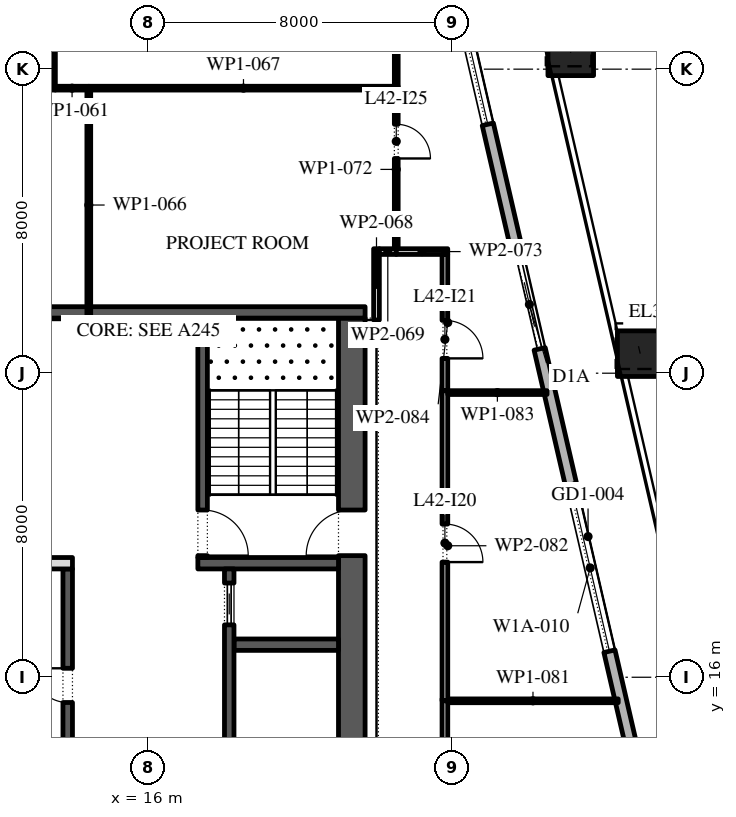
"""IFC4 building model, lengths in metres.
Left out: names, types, materials, properties, quantities, classifications, styles, units other than length and angle.
Written with IfcOpenShell. Run it as: python <this file> out.ifc"""

import sys

from ifc_helpers import new_model, si_unit, direction, frame, frame_2d, origin, origin_2d, place, context, subcontext, project, spatial, rectangle, extrude, element, fill, save


model = new_model("IFC4")
c1 = context("Model", 3, precision=1e-05, world=origin(), true_north=direction((0.0, 1.0)))
c2 = subcontext(c1, "Body", "Model", "MODEL_VIEW")
j1 = project(units=[si_unit("LENGTHUNIT", "METRE"), si_unit("PLANEANGLEUNIT", "RADIAN")], contexts=[c1])
p1 = place(None, origin())
s1 = spatial("IfcSite", under=j1, at=p1, CompositionType="ELEMENT")
p2 = place(p1, origin())
s2 = spatial("IfcBuilding", under=s1, at=p2, CompositionType="ELEMENT")
p3 = place(p2, frame((0.0, 0.0, 192.6)))
s3 = spatial("IfcBuildingStorey", under=s2, at=p3, CompositionType="ELEMENT", Elevation=192.6)
p4 = place(p3, frame((28.939, 24.514, 0.0), z_axis=(-0.010799648955, 0.046682353548, 0.998851403087), x_axis=(-0.974268511785, -0.225390476607, 0.0)))
e1 = element("IfcColumn", 1, at=p4, inside=s3, PredefinedType="COLUMN", context=c2, shape_type="SweptSolid", body=[
    extrude(rectangle(XDim=1.2, YDim=1.2, at=origin_2d()), origin(), (0.0, 0.0, 1.0), 4.205),
])
p5 = place(p3, frame((27.112, 32.43, 0.0), z_axis=(-0.013519814281, 0.05837310372, 0.998203283597), x_axis=(-0.974211350104, -0.225637420054, 0.0)))
e2 = element("IfcColumn", 2, at=p5, inside=s3, PredefinedType="COLUMN", context=c2, shape_type="SweptSolid", body=[
    extrude(rectangle(XDim=1.2, YDim=1.2, at=origin_2d()), origin(), (0.0, 0.0, 1.0), 4.208),
])
p6 = place(p3, frame((33.157, -5.092, 0.0), z_axis=(0.0, 0.0, 1.0), x_axis=(-0.224950279389, 0.974370243697, 0.0)))
e3 = element("IfcWall", 3, at=p6, inside=s3, PredefinedType="STANDARD", context=c2, shape_type="SweptSolid", body=[
    extrude(rectangle(XDim=49.5, YDim=0.3, at=frame_2d((24.75, 0.0))), origin(), (0.0, 0.0, 1.0), 4.0),
])
p7 = place(p6, frame((2.207, 0.0, 0.0)))
e4 = element("IfcOpeningElement", 4, at=p7, cuts=e3, PredefinedType="OPENING", context=c2, shape_type="SweptSolid", body=[
    extrude(rectangle(XDim=2.4, YDim=3.125, at=frame_2d((1.2, 1.562))), frame((0.0, 0.16, 0.0), z_axis=(0.0, -1.0, 0.0), x_axis=(1.0, 0.0, 0.0)), (0.0, 0.0, 1.0), 0.32),
])
p8 = place(p6, frame((8.121, 0.0, 0.45)))
e5 = element("IfcOpeningElement", 5, at=p8, cuts=e3, PredefinedType="OPENING", context=c2, shape_type="SweptSolid", body=[
    extrude(rectangle(XDim=4.5, YDim=2.875, at=frame_2d((2.25, 1.438))), frame((0.0, 0.16, 0.0), z_axis=(0.0, -1.0, 0.0), x_axis=(1.0, 0.0, 0.0)), (0.0, 0.0, 1.0), 0.32),
])
p9 = place(p6, frame((15.236, 0.0, 0.45)))
e6 = element("IfcOpeningElement", 6, at=p9, cuts=e3, PredefinedType="OPENING", context=c2, shape_type="SweptSolid", body=[
    extrude(rectangle(XDim=4.5, YDim=2.875, at=frame_2d((2.25, 1.438))), frame((0.0, 0.16, 0.0), z_axis=(0.0, -1.0, 0.0), x_axis=(1.0, 0.0, 0.0)), (0.0, 0.0, 1.0), 0.32),
])
p10 = place(p6, frame((22.35, 0.0, 0.45)))
e7 = element("IfcOpeningElement", 7, at=p10, cuts=e3, PredefinedType="OPENING", context=c2, shape_type="SweptSolid", body=[
    extrude(rectangle(XDim=4.5, YDim=3.0, at=frame_2d((2.25, 1.5))), frame((0.0, 0.16, 0.0), z_axis=(0.0, -1.0, 0.0), x_axis=(1.0, 0.0, 0.0)), (0.0, 0.0, 1.0), 0.32),
])
p11 = place(p6, frame((30.514, 0.0, 0.0)))
e8 = element("IfcOpeningElement", 8, at=p11, cuts=e3, PredefinedType="OPENING", context=c2, shape_type="SweptSolid", body=[
    extrude(rectangle(XDim=2.4, YDim=3.45, at=frame_2d((1.2, 1.725))), frame((0.0, 0.16, 0.0), z_axis=(0.0, -1.0, 0.0), x_axis=(1.0, 0.0, 0.0)), (0.0, 0.0, 1.0), 0.32),
])
p12 = place(p6, frame((36.579, 0.0, 0.45)))
e9 = element("IfcOpeningElement", 9, at=p12, cuts=e3, PredefinedType="OPENING", context=c2, shape_type="SweptSolid", body=[
    extrude(rectangle(XDim=4.5, YDim=3.05, at=frame_2d((2.25, 1.525))), frame((0.0, 0.16, 0.0), z_axis=(0.0, -1.0, 0.0), x_axis=(1.0, 0.0, 0.0)), (0.0, 0.0, 1.0), 0.32),
])
p13 = place(p6, frame((43.693, 0.0, 0.45)))
e10 = element("IfcOpeningElement", 10, at=p13, cuts=e3, PredefinedType="OPENING", context=c2, shape_type="SweptSolid", body=[
    extrude(rectangle(XDim=4.5, YDim=3.05, at=frame_2d((2.25, 1.525))), frame((0.0, 0.16, 0.0), z_axis=(0.0, -1.0, 0.0), x_axis=(1.0, 0.0, 0.0)), (0.0, 0.0, 1.0), 0.32),
])
p14 = place(p3, frame((21.35, -2.45, 0.0), z_axis=(0.0, 0.0, 1.0), x_axis=(0.0, 1.0, 0.0)))
e11 = element("IfcWall", 11, at=p14, inside=s3, PredefinedType="SHEAR", context=c2, shape_type="SweptSolid", body=[
    extrude(rectangle(XDim=27.9, YDim=0.7, at=frame_2d((13.95, 0.0))), origin(), (0.0, 0.0, 1.0), 4.0),
])
p15 = place(p14, frame((5.05, 0.0, 0.0)))
e12 = element("IfcOpeningElement", 12, at=p15, cuts=e11, PredefinedType="OPENING", context=c2, shape_type="SweptSolid", body=[
    extrude(rectangle(XDim=1.2, YDim=2.1, at=frame_2d((0.6, 1.05))), frame((0.0, 0.36, 0.0), z_axis=(0.0, -1.0, 0.0), x_axis=(1.0, 0.0, 0.0)), (0.0, 0.0, 1.0), 0.72),
])
p16 = place(p14, frame((21.65, 0.0, 0.0)))
e13 = element("IfcOpeningElement", 13, at=p16, cuts=e11, PredefinedType="OPENING", context=c2, shape_type="SweptSolid", body=[
    extrude(rectangle(XDim=1.2, YDim=2.1, at=frame_2d((0.6, 1.05))), frame((0.0, 0.36, 0.0), z_axis=(0.0, -1.0, 0.0), x_axis=(1.0, 0.0, 0.0)), (0.0, 0.0, 1.0), 0.72),
])
p17 = place(p3, frame((10.3, 25.6, 0.0), z_axis=(0.0, 0.0, 1.0), x_axis=(1.0, 0.0, 0.0)))
e14 = element("IfcWall", 14, at=p17, inside=s3, PredefinedType="SHEAR", context=c2, shape_type="SweptSolid", body=[
    extrude(rectangle(XDim=11.4, YDim=0.3, at=frame_2d((5.7, 0.0))), origin(), (0.0, 0.0, 1.0), 4.0),
])
p18 = place(p3, frame((17.3, 19.0, 0.0), z_axis=(0.0, 0.0, 1.0), x_axis=(1.0, 0.0, 0.0)))
e15 = element("IfcWall", 15, at=p18, inside=s3, PredefinedType="SHEAR", context=c2, shape_type="SweptSolid", body=[
    extrude(rectangle(XDim=3.7, YDim=0.3, at=frame_2d((1.85, 0.0))), origin(), (0.0, 0.0, 1.0), 4.0),
])
p19 = place(p3, frame((17.425, 19.15, 0.0), z_axis=(0.0, 0.0, 1.0), x_axis=(0.0, 1.0, 0.0)))
e16 = element("IfcWall", 16, at=p19, inside=s3, PredefinedType="SHEAR", context=c2, shape_type="SweptSolid", body=[
    extrude(rectangle(XDim=6.3, YDim=0.25, at=frame_2d((3.15, 0.0))), origin(), (0.0, 0.0, 1.0), 4.0),
])
p20 = place(p19, frame((0.05, 0.0, 0.0)))
e17 = element("IfcOpeningElement", 17, at=p20, cuts=e16, PredefinedType="OPENING", context=c2, shape_type="SweptSolid", body=[
    extrude(rectangle(XDim=1.2, YDim=2.1, at=frame_2d((0.6, 1.05))), frame((0.0, 0.135, 0.0), z_axis=(0.0, -1.0, 0.0), x_axis=(1.0, 0.0, 0.0)), (0.0, 0.0, 1.0), 0.27),
])
p21 = place(p3, frame((18.25, 16.857, 0.0), z_axis=(0.0, 0.0, 1.0), x_axis=(1.0, 0.0, 0.0)))
e18 = element("IfcWall", 18, at=p21, inside=s3, PredefinedType="SHEAR", context=c2, shape_type="SweptSolid", body=[
    extrude(rectangle(XDim=2.75, YDim=0.3, at=frame_2d((1.375, 0.0))), origin(), (0.0, 0.0, 1.0), 4.0),
])
p22 = place(p3, frame((18.125, 4.15, 0.0), z_axis=(0.0, 0.0, 1.0), x_axis=(0.0, 1.0, 0.0)))
e19 = element("IfcWall", 19, at=p22, inside=s3, PredefinedType="SHEAR", context=c2, shape_type="SweptSolid", body=[
    extrude(rectangle(XDim=14.7, YDim=0.25, at=frame_2d((7.35, 0.0))), origin(), (0.0, 0.0, 1.0), 4.0),
])
p23 = place(p22, frame((6.9, 0.0, 0.0)))
e20 = element("IfcOpeningElement", 20, at=p23, cuts=e19, PredefinedType="OPENING", context=c2, shape_type="SweptSolid", body=[
    extrude(rectangle(XDim=0.9, YDim=2.1, at=frame_2d((0.45, 1.05))), frame((0.0, 0.135, 0.0), z_axis=(0.0, -1.0, 0.0), x_axis=(1.0, 0.0, 0.0)), (0.0, 0.0, 1.0), 0.27),
])
p24 = place(p22, frame((0.371, 0.0, 0.0)))
e21 = element("IfcOpeningElement", 21, at=p24, cuts=e19, PredefinedType="OPENING", context=c2, shape_type="SweptSolid", body=[
    extrude(rectangle(XDim=1.1, YDim=2.1, at=frame_2d((0.55, 1.05))), frame((0.0, 0.135, 0.0), z_axis=(0.0, -1.0, 0.0), x_axis=(1.0, 0.0, 0.0)), (0.0, 0.0, 1.0), 0.27),
])
p25 = place(p22, frame((13.229, 0.0, 0.0)))
e22 = element("IfcOpeningElement", 22, at=p25, cuts=e19, PredefinedType="OPENING", context=c2, shape_type="SweptSolid", body=[
    extrude(rectangle(XDim=1.1, YDim=2.1, at=frame_2d((0.55, 1.05))), frame((0.0, 0.135, 0.0), z_axis=(0.0, -1.0, 0.0), x_axis=(1.0, 0.0, 0.0)), (0.0, 0.0, 1.0), 0.27),
])
p26 = place(p3, frame((13.875, -2.45, 0.0), z_axis=(0.0, 0.0, 1.0), x_axis=(0.0, 1.0, 0.0)))
e23 = element("IfcWall", 23, at=p26, inside=s3, PredefinedType="SHEAR", context=c2, shape_type="SweptSolid", body=[
    extrude(rectangle(XDim=21.3, YDim=0.25, at=frame_2d((10.65, 0.0))), origin(), (0.0, 0.0, 1.0), 4.0),
])
p27 = place(p26, frame((17.786, 0.0, 0.0)))
e24 = element("IfcOpeningElement", 24, at=p27, cuts=e23, PredefinedType="OPENING", context=c2, shape_type="SweptSolid", body=[
    extrude(rectangle(XDim=0.9, YDim=2.1, at=frame_2d((0.45, 1.05))), frame((0.0, 0.135, 0.0), z_axis=(0.0, -1.0, 0.0), x_axis=(1.0, 0.0, 0.0)), (0.0, 0.0, 1.0), 0.27),
])
p28 = place(p26, frame((6.971, 0.0, 0.0)))
e25 = element("IfcOpeningElement", 25, at=p28, cuts=e23, PredefinedType="OPENING", context=c2, shape_type="SweptSolid", body=[
    extrude(rectangle(XDim=1.1, YDim=2.1, at=frame_2d((0.55, 1.05))), frame((0.0, 0.135, 0.0), z_axis=(0.0, -1.0, 0.0), x_axis=(1.0, 0.0, 0.0)), (0.0, 0.0, 1.0), 0.27),
])
p29 = place(p26, frame((9.114, 0.0, 0.0)))
e26 = element("IfcOpeningElement", 26, at=p29, cuts=e23, PredefinedType="OPENING", context=c2, shape_type="SweptSolid", body=[
    extrude(rectangle(XDim=1.1, YDim=2.1, at=frame_2d((0.55, 1.05))), frame((0.0, 0.135, 0.0), z_axis=(0.0, -1.0, 0.0), x_axis=(1.0, 0.0, 0.0)), (0.0, 0.0, 1.0), 0.27),
])
p30 = place(p26, frame((11.257, 0.0, 0.0)))
e27 = element("IfcOpeningElement", 27, at=p30, cuts=e23, PredefinedType="OPENING", context=c2, shape_type="SweptSolid", body=[
    extrude(rectangle(XDim=1.1, YDim=2.1, at=frame_2d((0.55, 1.05))), frame((0.0, 0.135, 0.0), z_axis=(0.0, -1.0, 0.0), x_axis=(1.0, 0.0, 0.0)), (0.0, 0.0, 1.0), 0.27),
])
p31 = place(p26, frame((13.4, 0.0, 0.0)))
e28 = element("IfcOpeningElement", 28, at=p31, cuts=e23, PredefinedType="OPENING", context=c2, shape_type="SweptSolid", body=[
    extrude(rectangle(XDim=1.1, YDim=2.1, at=frame_2d((0.55, 1.05))), frame((0.0, 0.135, 0.0), z_axis=(0.0, -1.0, 0.0), x_axis=(1.0, 0.0, 0.0)), (0.0, 0.0, 1.0), 0.27),
])
p32 = place(p3, frame((11.0, 19.0, 0.0), z_axis=(0.0, 0.0, 1.0), x_axis=(1.0, 0.0, 0.0)))
e29 = element("IfcWall", 29, at=p32, inside=s3, PredefinedType="PARTITIONING", context=c2, shape_type="SweptSolid", body=[
    extrude(rectangle(XDim=3.0, YDim=0.3, at=frame_2d((1.5, 0.0))), origin(), (0.0, 0.0, 1.0), 4.0),
])
p33 = place(p3, frame((9.78, 31.5, 0.0), z_axis=(0.0, 0.0, 1.0), x_axis=(1.0, 0.0, 0.0)))
e30 = element("IfcWall", 30, at=p33, inside=s3, PredefinedType="PARTITIONING", context=c2, shape_type="SweptSolid", body=[
    extrude(rectangle(XDim=3.77, YDim=0.1, at=frame_2d((1.885, 0.0))), origin(), (0.0, 0.0, 1.0), 4.0),
])
p34 = place(p3, frame((13.55, 31.5, 0.0), z_axis=(0.0, 0.0, 1.0), x_axis=(1.0, 0.0, 0.0)))
e31 = element("IfcWall", 31, at=p34, inside=s3, PredefinedType="PARTITIONING", context=c2, shape_type="SweptSolid", body=[
    extrude(rectangle(XDim=0.88, YDim=0.1, at=frame_2d((0.44, 0.0))), origin(), (0.0, 0.0, 1.0), 4.0),
])
p35 = place(p3, frame((13.5, 39.95, 0.0), z_axis=(0.0, 0.0, 1.0), x_axis=(0.0, -1.0, 0.0)))
e32 = element("IfcWall", 32, at=p35, inside=s3, PredefinedType="PARTITIONING", context=c2, shape_type="SweptSolid", body=[
    extrude(rectangle(XDim=8.4, YDim=0.1, at=frame_2d((4.2, 0.0))), origin(), (0.0, 0.0, 1.0), 4.0),
])
p36 = place(p3, frame((14.43, 31.45, 0.0), z_axis=(0.0, 0.0, 1.0), x_axis=(0.0, -1.0, 0.0)))
e33 = element("IfcWall", 33, at=p36, inside=s3, PredefinedType="PARTITIONING", context=c2, shape_type="SweptSolid", body=[
    extrude(rectangle(XDim=6.05, YDim=0.1, at=frame_2d((3.025, 0.0))), origin(), (0.0, 0.0, 1.0), 4.0),
])
p37 = place(p3, frame((14.43, 31.5, 0.0), z_axis=(0.0, 0.0, 1.0), x_axis=(1.0, 0.0, 0.0)))
e34 = element("IfcWall", 34, at=p37, inside=s3, PredefinedType="PARTITIONING", context=c2, shape_type="SweptSolid", body=[
    extrude(rectangle(XDim=8.14, YDim=0.1, at=frame_2d((4.07, 0.0))), origin(), (0.0, 0.0, 1.0), 4.0),
])
p38 = place(p3, frame((22.0, 25.4, 0.0), z_axis=(0.0, 0.0, 1.0), x_axis=(0.0, 1.0, 0.0)))
e35 = element("IfcWall", 35, at=p38, inside=s3, PredefinedType="PARTITIONING", context=c2, shape_type="SweptSolid", body=[
    extrude(rectangle(XDim=1.875, YDim=0.15, at=frame_2d((0.938, 0.0))), origin(), (0.0, 0.0, 1.0), 4.0),
])
p39 = place(p3, frame((22.075, 27.2, 0.0), z_axis=(0.0, 0.0, 1.0), x_axis=(1.0, 0.0, 0.0)))
e36 = element("IfcWall", 36, at=p39, inside=s3, PredefinedType="PARTITIONING", context=c2, shape_type="SweptSolid", body=[
    extrude(rectangle(XDim=0.445, YDim=0.15, at=frame_2d((0.223, 0.0))), origin(), (0.0, 0.0, 1.0), 4.0),
])
p40 = place(p3, frame((22.52, 27.275, 0.0), z_axis=(0.0, 0.0, 1.0), x_axis=(0.0, 1.0, 0.0)))
e37 = element("IfcWall", 37, at=p40, inside=s3, PredefinedType="PARTITIONING", context=c2, shape_type="SweptSolid", body=[
    extrude(rectangle(XDim=4.175, YDim=0.1, at=frame_2d((2.087, 0.0))), origin(), (0.0, 0.0, 1.0), 4.0),
])
p41 = place(p40, frame((2.375, 0.0, 0.0)))
e38 = element("IfcOpeningElement", 38, at=p41, cuts=e37, PredefinedType="OPENING", context=c2, shape_type="SweptSolid", body=[
    extrude(rectangle(XDim=0.9, YDim=2.1, at=frame_2d((0.45, 1.05))), frame((0.0, 0.06, 0.0), z_axis=(0.0, -1.0, 0.0), x_axis=(1.0, 0.0, 0.0)), (0.0, 0.0, 1.0), 0.12),
])
p42 = place(p3, frame((22.52, 27.2, 0.0), z_axis=(0.0, 0.0, 1.0), x_axis=(1.0, 0.0, 0.0)))
e39 = element("IfcWall", 39, at=p42, inside=s3, PredefinedType="PARTITIONING", context=c2, shape_type="SweptSolid", body=[
    extrude(rectangle(XDim=1.355, YDim=0.15, at=frame_2d((0.677, 0.0))), origin(), (0.0, 0.0, 1.0), 4.0),
])
p43 = place(p3, frame((22.52, 31.55, 0.0), z_axis=(0.0, 0.0, 1.0), x_axis=(0.0, 1.0, 0.0)))
e40 = element("IfcWall", 40, at=p43, inside=s3, PredefinedType="PARTITIONING", context=c2, shape_type="SweptSolid", body=[
    extrude(rectangle(XDim=5.55, YDim=0.1, at=frame_2d((2.775, 0.0))), origin(), (0.0, 0.0, 1.0), 4.0),
])
p44 = place(p3, frame((23.8, 15.43, 0.0), z_axis=(0.0, 0.0, 1.0), x_axis=(0.0, -1.0, 0.0)))
e41 = element("IfcWall", 41, at=p44, inside=s3, PredefinedType="PARTITIONING", context=c2, shape_type="SweptSolid", body=[
    extrude(rectangle(XDim=13.92, YDim=0.15, at=frame_2d((6.96, 0.0))), origin(), (0.0, 0.0, 1.0), 4.0),
])
p45 = place(p44, frame((9.27, 0.0, 0.0)))
e42 = element("IfcOpeningElement", 42, at=p45, cuts=e41, PredefinedType="OPENING", context=c2, shape_type="SweptSolid", body=[
    extrude(rectangle(XDim=1.0, YDim=2.1, at=frame_2d((0.5, 1.05))), frame((0.0, 0.085, 0.0), z_axis=(0.0, -1.0, 0.0), x_axis=(1.0, 0.0, 0.0)), (0.0, 0.0, 1.0), 0.17),
])
p46 = place(p3, frame((23.875, 15.38, 0.0), z_axis=(0.0, 0.0, 1.0), x_axis=(1.0, 0.0, 0.0)))
e43 = element("IfcWall", 43, at=p46, inside=s3, PredefinedType="PARTITIONING", context=c2, shape_type="SweptSolid", body=[
    extrude(rectangle(XDim=4.485, YDim=0.1, at=frame_2d((2.243, 0.0))), origin(), (0.0, 0.0, 1.0), 4.0),
])
p47 = place(p3, frame((23.8, 23.54, 0.0), z_axis=(0.0, 0.0, 1.0), x_axis=(0.0, -1.0, 0.0)))
e44 = element("IfcWall", 44, at=p47, inside=s3, PredefinedType="PARTITIONING", context=c2, shape_type="SweptSolid", body=[
    extrude(rectangle(XDim=8.16, YDim=0.15, at=frame_2d((4.08, 0.0))), origin(), (0.0, 0.0, 1.0), 4.0),
])
p48 = place(p47, frame((3.51, 0.0, 0.0)))
e45 = element("IfcOpeningElement", 45, at=p48, cuts=e44, PredefinedType="OPENING", context=c2, shape_type="SweptSolid", body=[
    extrude(rectangle(XDim=1.0, YDim=2.1, at=frame_2d((0.5, 1.05))), frame((0.0, 0.085, 0.0), z_axis=(0.0, -1.0, 0.0), x_axis=(1.0, 0.0, 0.0)), (0.0, 0.0, 1.0), 0.17),
])
p49 = place(p3, frame((23.875, 23.49, 0.0), z_axis=(0.0, 0.0, 1.0), x_axis=(1.0, 0.0, 0.0)))
e46 = element("IfcWall", 46, at=p49, inside=s3, PredefinedType="PARTITIONING", context=c2, shape_type="SweptSolid", body=[
    extrude(rectangle(XDim=2.612, YDim=0.1, at=frame_2d((1.306, 0.0))), origin(), (0.0, 0.0, 1.0), 4.0),
])
p50 = place(p3, frame((23.8, 27.125, 0.0), z_axis=(0.0, 0.0, 1.0), x_axis=(0.0, -1.0, 0.0)))
e47 = element("IfcWall", 47, at=p50, inside=s3, PredefinedType="PARTITIONING", context=c2, shape_type="SweptSolid", body=[
    extrude(rectangle(XDim=3.585, YDim=0.15, at=frame_2d((1.792, 0.0))), origin(), (0.0, 0.0, 1.0), 4.0),
])
p51 = place(p50, frame((1.735, 0.0, 0.0)))
e48 = element("IfcOpeningElement", 48, at=p51, cuts=e47, PredefinedType="OPENING", context=c2, shape_type="SweptSolid", body=[
    extrude(rectangle(XDim=1.0, YDim=2.1, at=frame_2d((0.5, 1.05))), frame((0.0, 0.085, 0.0), z_axis=(0.0, -1.0, 0.0), x_axis=(1.0, 0.0, 0.0)), (0.0, 0.0, 1.0), 0.17),
])
p52 = place(p10, origin())
e49 = element("IfcWindow", 49, at=p52, inside=s3, PartitioningType="DOUBLE_PANEL_VERTICAL", PredefinedType="WINDOW", context=c2, shape_type="SweptSolid", body=[
    extrude(rectangle(XDim=4.5, YDim=3.0, at=frame_2d((2.25, 1.5))), frame((0.0, 0.03, 0.0), z_axis=(0.0, -1.0, 0.0), x_axis=(1.0, 0.0, 0.0)), (0.0, 0.0, 1.0), 0.06),
])
fill(e7, e49)
p53 = place(p11, origin())
e50 = element("IfcDoor", 50, at=p53, inside=s3, OperationType="DOUBLE_DOOR_SLIDING", PredefinedType="DOOR", context=c2, shape_type="SweptSolid", body=[
    extrude(rectangle(XDim=2.4, YDim=3.45, at=frame_2d((1.2, 1.725))), frame((0.0, 0.025, 0.0), z_axis=(0.0, -1.0, 0.0), x_axis=(1.0, 0.0, 0.0)), (0.0, 0.0, 1.0), 0.05),
])
fill(e8, e50)
p54 = place(p12, origin())
e51 = element("IfcWindow", 51, at=p54, inside=s3, PartitioningType="DOUBLE_PANEL_VERTICAL", PredefinedType="WINDOW", context=c2, shape_type="SweptSolid", body=[
    extrude(rectangle(XDim=4.5, YDim=3.05, at=frame_2d((2.25, 1.525))), frame((0.0, 0.03, 0.0), z_axis=(0.0, -1.0, 0.0), x_axis=(1.0, 0.0, 0.0)), (0.0, 0.0, 1.0), 0.06),
])
fill(e9, e51)
p55 = place(p25, origin())
e52 = element("IfcDoor", 52, at=p55, inside=s3, OperationType="SLIDING_TO_LEFT", PredefinedType="DOOR", context=c2, shape_type="SweptSolid", body=[
    extrude(rectangle(XDim=1.1, YDim=2.1, at=frame_2d((0.55, 1.05))), frame((0.0, 0.025, 0.0), z_axis=(0.0, -1.0, 0.0), x_axis=(1.0, 0.0, 0.0)), (0.0, 0.0, 1.0), 0.05),
])
fill(e22, e52)
p56 = place(p27, origin())
e53 = element("IfcDoor", 53, at=p56, inside=s3, OperationType="SINGLE_SWING_LEFT", PredefinedType="DOOR", context=c2, shape_type="SweptSolid", body=[
    extrude(rectangle(XDim=0.9, YDim=2.1, at=frame_2d((0.45, 1.05))), frame((0.0, 0.125, 0.0), z_axis=(0.0, -1.0, 0.0), x_axis=(1.0, 0.0, 0.0)), (0.0, 0.0, 1.0), 0.05),
])
fill(e24, e53)
p57 = place(p20, frame((1.2, 0.0, 0.0), z_axis=(0.0, 0.0, 1.0), x_axis=(-1.0, 0.0, 0.0)))
e54 = element("IfcDoor", 54, at=p57, inside=s3, OperationType="SINGLE_SWING_LEFT", PredefinedType="DOOR", context=c2, shape_type="SweptSolid", body=[
    extrude(rectangle(XDim=1.2, YDim=2.1, at=frame_2d((0.6, 1.05))), frame((0.0, 0.025, 0.0), z_axis=(0.0, -1.0, 0.0), x_axis=(1.0, 0.0, 0.0)), (0.0, 0.0, 1.0), 0.05),
])
fill(e17, e54)
p58 = place(p16, origin())
e55 = element("IfcDoor", 55, at=p58, inside=s3, OperationType="SINGLE_SWING_RIGHT", PredefinedType="DOOR", context=c2, shape_type="SweptSolid", body=[
    extrude(rectangle(XDim=1.2, YDim=2.1, at=frame_2d((0.6, 1.05))), frame((0.0, 0.025, 0.0), z_axis=(0.0, -1.0, 0.0), x_axis=(1.0, 0.0, 0.0)), (0.0, 0.0, 1.0), 0.05),
])
fill(e13, e55)
p59 = place(p48, origin())
e56 = element("IfcDoor", 56, at=p59, inside=s3, OperationType="SINGLE_SWING_LEFT", PredefinedType="DOOR", context=c2, shape_type="SweptSolid", body=[
    extrude(rectangle(XDim=1.0, YDim=2.1, at=frame_2d((0.5, 1.05))), frame((0.0, 0.025, 0.0), z_axis=(0.0, -1.0, 0.0), x_axis=(1.0, 0.0, 0.0)), (0.0, 0.0, 1.0), 0.05),
])
fill(e45, e56)
p60 = place(p51, origin())
e57 = element("IfcDoor", 57, at=p60, inside=s3, OperationType="SINGLE_SWING_LEFT", PredefinedType="DOOR", context=c2, shape_type="SweptSolid", body=[
    extrude(rectangle(XDim=1.0, YDim=2.1, at=frame_2d((0.5, 1.05))), frame((0.0, 0.025, 0.0), z_axis=(0.0, -1.0, 0.0), x_axis=(1.0, 0.0, 0.0)), (0.0, 0.0, 1.0), 0.05),
])
fill(e48, e57)
p61 = place(p41, frame((0.9, 0.0, 0.0), z_axis=(0.0, 0.0, 1.0), x_axis=(-1.0, 0.0, 0.0)))
e58 = element("IfcDoor", 58, at=p61, inside=s3, OperationType="SINGLE_SWING_LEFT", PredefinedType="DOOR", context=c2, shape_type="SweptSolid", body=[
    extrude(rectangle(XDim=0.9, YDim=2.1, at=frame_2d((0.45, 1.05))), frame((0.0, 0.025, 0.0), z_axis=(0.0, -1.0, 0.0), x_axis=(1.0, 0.0, 0.0)), (0.0, 0.0, 1.0), 0.05),
])
fill(e38, e58)
save(model, sys.argv[1])
